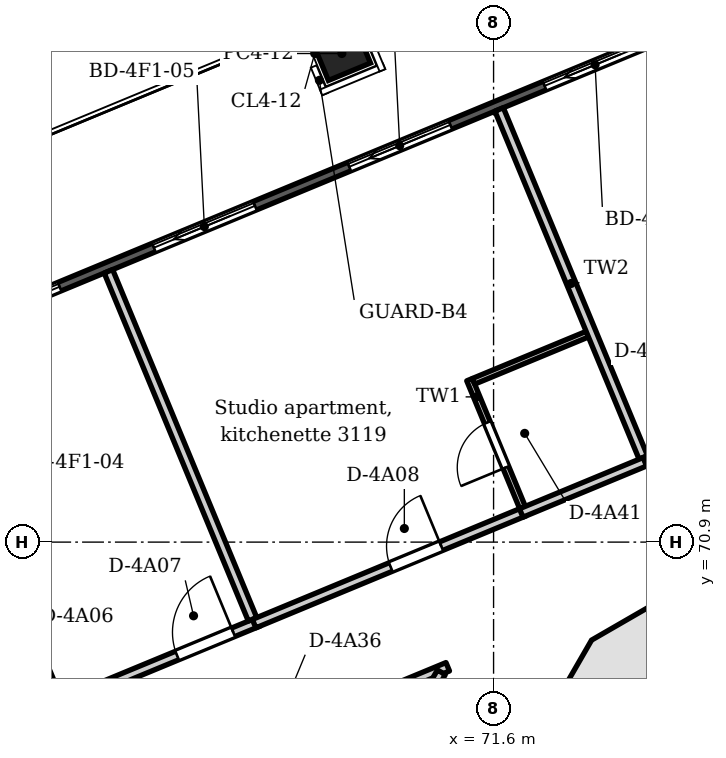
"""IFC4 building model, lengths in metres.
Left out: names, types, materials, properties, quantities, classifications, styles, units other than length and angle.
Written with IfcOpenShell. Run it as: python <this file> out.ifc"""

import sys

from ifc_helpers import new_model, si_unit, direction, frame, frame_2d, origin, origin_2d, place, context, subcontext, project, spatial, polyline, rectangle, outline, extrude, element, fill, save


model = new_model("IFC4")
c1 = context("Model", 3, precision=1e-05, world=origin(), true_north=direction((0.0, 1.0)))
c2 = subcontext(c1, "Body", "Model", "MODEL_VIEW")
j1 = project(units=[si_unit("LENGTHUNIT", "METRE"), si_unit("PLANEANGLEUNIT", "RADIAN")], contexts=[c1])
p1 = place(None, origin())
s1 = spatial("IfcSite", under=j1, at=p1, CompositionType="ELEMENT")
p2 = place(p1, origin())
s2 = spatial("IfcBuilding", under=s1, at=p2, CompositionType="ELEMENT")
p3 = place(p2, frame((0.0, 0.0, 124.2)))
s3 = spatial("IfcBuildingStorey", under=s2, at=p3, CompositionType="ELEMENT", Elevation=124.2)
p4 = place(p3, frame((77.74, 71.383, 0.0), z_axis=(0.0, 0.0, 1.0), x_axis=(-0.866003133579, -0.500038571144, 0.0)))
e1 = element("IfcWall", 1, at=p4, inside=s3, PredefinedType="SHEAR", context=c2, shape_type="SweptSolid", body=[
    extrude(outline(polyline([(0.0, -0.45), (4.969, -0.45), (4.728, 0.45), (0.241, 0.45), (0.0, -0.45)])), origin(), (0.0, 0.0, 1.0), 3.6),
])
p5 = place(p4, frame((0.895, 0.0, 0.0)))
e2 = element("IfcOpeningElement", 2, at=p5, cuts=e1, PredefinedType="OPENING", context=c2, shape_type="SweptSolid", body=[
    extrude(rectangle(XDim=0.9, YDim=2.1, at=frame_2d((0.45, 1.05))), frame((0.0, 0.46, 0.0), z_axis=(0.0, -1.0, 0.0), x_axis=(1.0, 0.0, 0.0)), (0.0, 0.0, 1.0), 0.92),
])
p6 = place(p4, frame((3.184, 0.0, 0.0)))
e3 = element("IfcOpeningElement", 3, at=p6, cuts=e1, PredefinedType="OPENING", context=c2, shape_type="SweptSolid", body=[
    extrude(rectangle(XDim=0.9, YDim=2.1, at=frame_2d((0.45, 1.05))), frame((0.0, 0.46, 0.0), z_axis=(0.0, -1.0, 0.0), x_axis=(1.0, 0.0, 0.0)), (0.0, 0.0, 1.0), 0.92),
])
p7 = place(p3, frame((73.602, 69.063, 0.0), z_axis=(0.0, 0.0, 1.0), x_axis=(-0.500038571144, -0.866003133579, 0.0)))
e4 = element("IfcWall", 4, at=p7, inside=s3, PredefinedType="SHEAR", context=c2, shape_type="SweptSolid", body=[
    extrude(outline(polyline([(0.0, -0.45), (4.969, -0.45), (4.728, 0.45), (0.241, 0.45), (0.0, -0.45)])), origin(), (0.0, 0.0, 1.0), 3.6),
])
p8 = place(p7, frame((1.285, 0.0, 0.0)))
e5 = element("IfcOpeningElement", 5, at=p8, cuts=e4, PredefinedType="OPENING", context=c2, shape_type="SweptSolid", body=[
    extrude(rectangle(XDim=2.4, YDim=2.1, at=frame_2d((1.2, 1.05))), frame((0.0, 0.46, 0.0), z_axis=(0.0, -1.0, 0.0), x_axis=(1.0, 0.0, 0.0)), (0.0, 0.0, 1.0), 0.92),
])
p9 = place(p3, frame((69.105, 78.935, -0.35), z_axis=(0.0, 0.0, 1.0), x_axis=(0.923879532511, 0.382683432365, 0.0)))
e6 = element("IfcColumn", 6, at=p9, inside=s3, PredefinedType="COLUMN", context=c2, shape_type="SweptSolid", body=[
    extrude(rectangle(XDim=0.75, YDim=0.65, at=origin_2d()), origin(), (0.0, 0.0, 1.0), 3.95),
])
p10 = place(p3, frame((52.387, 70.1, 0.0), z_axis=(0.0, 0.0, 1.0), x_axis=(0.92388051416, 0.382681062447, 0.0)))
e7 = element("IfcWall", 7, at=p10, inside=s3, PredefinedType="SOLIDWALL", context=c2, shape_type="SweptSolid", body=[
    extrude(outline(polyline([(0.149, 0.075), (0.149, -0.075), (45.057, -0.075), (45.057, 0.075), (0.149, 0.075)])), origin(), (0.0, 0.0, 1.0), 3.3),
])
p11 = place(p10, frame((1.239, 0.0, 0.0)))
e8 = element("IfcOpeningElement", 8, at=p11, cuts=e7, PredefinedType="OPENING", context=c2, shape_type="SweptSolid", body=[
    extrude(rectangle(XDim=1.8, YDim=2.6, at=frame_2d((0.9, 1.3))), frame((0.0, 0.085, 0.0), z_axis=(0.0, -1.0, 0.0), x_axis=(1.0, 0.0, 0.0)), (0.0, 0.0, 1.0), 0.17),
])
p12 = place(p10, frame((4.316, 0.0, 0.0)))
e9 = element("IfcOpeningElement", 9, at=p12, cuts=e7, PredefinedType="OPENING", context=c2, shape_type="SweptSolid", body=[
    extrude(rectangle(XDim=1.8, YDim=2.6, at=frame_2d((0.9, 1.3))), frame((0.0, 0.085, 0.0), z_axis=(0.0, -1.0, 0.0), x_axis=(1.0, 0.0, 0.0)), (0.0, 0.0, 1.0), 0.17),
])
p13 = place(p10, frame((7.793, 0.0, 0.0)))
e10 = element("IfcOpeningElement", 10, at=p13, cuts=e7, PredefinedType="OPENING", context=c2, shape_type="SweptSolid", body=[
    extrude(rectangle(XDim=1.8, YDim=2.6, at=frame_2d((0.9, 1.3))), frame((0.0, 0.085, 0.0), z_axis=(0.0, -1.0, 0.0), x_axis=(1.0, 0.0, 0.0)), (0.0, 0.0, 1.0), 0.17),
])
p14 = place(p10, frame((11.271, 0.0, 0.0)))
e11 = element("IfcOpeningElement", 11, at=p14, cuts=e7, PredefinedType="OPENING", context=c2, shape_type="SweptSolid", body=[
    extrude(rectangle(XDim=1.8, YDim=2.6, at=frame_2d((0.9, 1.3))), frame((0.0, 0.085, 0.0), z_axis=(0.0, -1.0, 0.0), x_axis=(1.0, 0.0, 0.0)), (0.0, 0.0, 1.0), 0.17),
])
p15 = place(p10, frame((14.748, 0.0, 0.0)))
e12 = element("IfcOpeningElement", 12, at=p15, cuts=e7, PredefinedType="OPENING", context=c2, shape_type="SweptSolid", body=[
    extrude(rectangle(XDim=1.8, YDim=2.6, at=frame_2d((0.9, 1.3))), frame((0.0, 0.085, 0.0), z_axis=(0.0, -1.0, 0.0), x_axis=(1.0, 0.0, 0.0)), (0.0, 0.0, 1.0), 0.17),
])
p16 = place(p10, frame((18.226, 0.0, 0.0)))
e13 = element("IfcOpeningElement", 13, at=p16, cuts=e7, PredefinedType="OPENING", context=c2, shape_type="SweptSolid", body=[
    extrude(rectangle(XDim=1.8, YDim=2.6, at=frame_2d((0.9, 1.3))), frame((0.0, 0.085, 0.0), z_axis=(0.0, -1.0, 0.0), x_axis=(1.0, 0.0, 0.0)), (0.0, 0.0, 1.0), 0.17),
])
p17 = place(p10, frame((21.703, 0.0, 0.0)))
e14 = element("IfcOpeningElement", 14, at=p17, cuts=e7, PredefinedType="OPENING", context=c2, shape_type="SweptSolid", body=[
    extrude(rectangle(XDim=1.8, YDim=2.6, at=frame_2d((0.9, 1.3))), frame((0.0, 0.085, 0.0), z_axis=(0.0, -1.0, 0.0), x_axis=(1.0, 0.0, 0.0)), (0.0, 0.0, 1.0), 0.17),
])
p18 = place(p10, frame((25.18, 0.0, 0.0)))
e15 = element("IfcOpeningElement", 15, at=p18, cuts=e7, PredefinedType="OPENING", context=c2, shape_type="SweptSolid", body=[
    extrude(rectangle(XDim=1.8, YDim=2.6, at=frame_2d((0.9, 1.3))), frame((0.0, 0.085, 0.0), z_axis=(0.0, -1.0, 0.0), x_axis=(1.0, 0.0, 0.0)), (0.0, 0.0, 1.0), 0.17),
])
p19 = place(p10, frame((28.658, 0.0, 0.0)))
e16 = element("IfcOpeningElement", 16, at=p19, cuts=e7, PredefinedType="OPENING", context=c2, shape_type="SweptSolid", body=[
    extrude(rectangle(XDim=1.8, YDim=2.6, at=frame_2d((0.9, 1.3))), frame((0.0, 0.085, 0.0), z_axis=(0.0, -1.0, 0.0), x_axis=(1.0, 0.0, 0.0)), (0.0, 0.0, 1.0), 0.17),
])
p20 = place(p10, frame((32.135, 0.0, 0.0)))
e17 = element("IfcOpeningElement", 17, at=p20, cuts=e7, PredefinedType="OPENING", context=c2, shape_type="SweptSolid", body=[
    extrude(rectangle(XDim=1.8, YDim=2.6, at=frame_2d((0.9, 1.3))), frame((0.0, 0.085, 0.0), z_axis=(0.0, -1.0, 0.0), x_axis=(1.0, 0.0, 0.0)), (0.0, 0.0, 1.0), 0.17),
])
p21 = place(p10, frame((35.613, 0.0, 0.0)))
e18 = element("IfcOpeningElement", 18, at=p21, cuts=e7, PredefinedType="OPENING", context=c2, shape_type="SweptSolid", body=[
    extrude(rectangle(XDim=1.8, YDim=2.6, at=frame_2d((0.9, 1.3))), frame((0.0, 0.085, 0.0), z_axis=(0.0, -1.0, 0.0), x_axis=(1.0, 0.0, 0.0)), (0.0, 0.0, 1.0), 0.17),
])
p22 = place(p10, frame((39.09, 0.0, 0.0)))
e19 = element("IfcOpeningElement", 19, at=p22, cuts=e7, PredefinedType="OPENING", context=c2, shape_type="SweptSolid", body=[
    extrude(rectangle(XDim=1.8, YDim=2.6, at=frame_2d((0.9, 1.3))), frame((0.0, 0.085, 0.0), z_axis=(0.0, -1.0, 0.0), x_axis=(1.0, 0.0, 0.0)), (0.0, 0.0, 1.0), 0.17),
])
p23 = place(p10, frame((42.167, 0.0, 0.0)))
e20 = element("IfcOpeningElement", 20, at=p23, cuts=e7, PredefinedType="OPENING", context=c2, shape_type="SweptSolid", body=[
    extrude(rectangle(XDim=1.8, YDim=2.6, at=frame_2d((0.9, 1.3))), frame((0.0, 0.085, 0.0), z_axis=(0.0, -1.0, 0.0), x_axis=(1.0, 0.0, 0.0)), (0.0, 0.0, 1.0), 0.17),
])
p24 = place(p3, origin())
e21 = element("IfcWall", 21, at=p24, inside=s3, PredefinedType="PARAPET", context=c2, shape_type="SweptSolid", body=[
    extrude(outline(polyline([(76.333, 82.578), (47.563, 75.405), (47.803, 75.156), (74.457, 81.802), (76.333, 82.578)])), origin(), (0.0, 0.0, 1.0), 1.1),
])
p25 = place(p3, frame((62.053, 74.022, 0.0), z_axis=(0.0, 0.0, 1.0), x_axis=(0.382821977845, -0.923822132923, 0.0)))
e22 = element("IfcWall", 22, at=p25, inside=s3, PredefinedType="PARTITIONING", context=c2, shape_type="SweptSolid", body=[
    extrude(rectangle(XDim=6.344, YDim=0.15, at=frame_2d((3.172, 0.0))), origin(), (0.0, 0.0, 1.0), 3.3),
])
p26 = place(p3, frame((64.519, 68.258, 0.0), z_axis=(0.0, 0.0, 1.0), x_axis=(0.923914357305, 0.382599347053, 0.0)))
e23 = element("IfcWall", 23, at=p26, inside=s3, PredefinedType="PARTITIONING", context=c2, shape_type="SweptSolid", body=[
    extrude(rectangle(XDim=3.484, YDim=0.15, at=frame_2d((1.742, 0.0))), origin(), (0.0, 0.0, 1.0), 3.3),
])
p27 = place(p26, frame((2.031, 0.0, 0.0)))
e24 = element("IfcOpeningElement", 24, at=p27, cuts=e23, PredefinedType="OPENING", context=c2, shape_type="SweptSolid", body=[
    extrude(rectangle(XDim=1.0, YDim=2.1, at=frame_2d((0.5, 1.05))), frame((0.0, 0.085, 0.0), z_axis=(0.0, -1.0, 0.0), x_axis=(1.0, 0.0, 0.0)), (0.0, 0.0, 1.0), 0.17),
])
p28 = place(p3, frame((65.266, 75.353, 0.0), z_axis=(0.0, 0.0, 1.0), x_axis=(0.382610562407, -0.923909712869, 0.0)))
e25 = element("IfcWall", 25, at=p28, inside=s3, PredefinedType="PARTITIONING", context=c2, shape_type="SweptSolid", body=[
    extrude(rectangle(XDim=6.194, YDim=0.15, at=frame_2d((3.097, 0.0))), origin(), (0.0, 0.0, 1.0), 3.3),
])
p29 = place(p3, frame((65.981, 66.834, 0.0), z_axis=(0.0, 0.0, 1.0), x_axis=(0.923830903719, 0.382800811563, 0.0)))
e26 = element("IfcWall", 26, at=p29, inside=s3, PredefinedType="PARTITIONING", context=c2, shape_type="SweptSolid", body=[
    extrude(rectangle(XDim=5.266, YDim=0.15, at=frame_2d((2.633, 0.0))), origin(), (0.0, 0.0, 1.0), 3.3),
])
p30 = place(p29, frame((2.146, 0.0, 0.0)))
e27 = element("IfcOpeningElement", 27, at=p30, cuts=e26, PredefinedType="OPENING", context=c2, shape_type="SweptSolid", body=[
    extrude(rectangle(XDim=0.9, YDim=2.1, at=frame_2d((0.45, 1.05))), frame((0.0, 0.085, 0.0), z_axis=(0.0, -1.0, 0.0), x_axis=(1.0, 0.0, 0.0)), (0.0, 0.0, 1.0), 0.17),
])
p31 = place(p3, frame((67.662, 69.559, 0.0), z_axis=(0.0, 0.0, 1.0), x_axis=(0.923858526334, 0.382734141827, 0.0)))
e28 = element("IfcWall", 28, at=p31, inside=s3, PredefinedType="PARTITIONING", context=c2, shape_type="SweptSolid", body=[
    extrude(rectangle(XDim=4.812, YDim=0.15, at=frame_2d((2.406, 0.0))), origin(), (0.0, 0.0, 1.0), 3.3),
])
p32 = place(p31, frame((2.431, 0.0, 0.0)))
e29 = element("IfcOpeningElement", 29, at=p32, cuts=e28, PredefinedType="OPENING", context=c2, shape_type="SweptSolid", body=[
    extrude(rectangle(XDim=0.9, YDim=2.1, at=frame_2d((0.45, 1.05))), frame((0.0, 0.085, 0.0), z_axis=(0.0, -1.0, 0.0), x_axis=(1.0, 0.0, 0.0)), (0.0, 0.0, 1.0), 0.17),
])
p33 = place(p3, frame((68.852, 65.487, 0.0), z_axis=(0.0, 0.0, 1.0), x_axis=(0.500065504582, 0.865987581393, 0.0)))
e30 = element("IfcWall", 30, at=p33, inside=s3, PredefinedType="PARTITIONING", context=c2, shape_type="SweptSolid", body=[
    extrude(rectangle(XDim=3.778, YDim=0.15, at=frame_2d((1.889, 0.0))), origin(), (0.0, 0.0, 1.0), 3.3),
])
p34 = place(p3, frame((71.205, 73.571, 0.0), z_axis=(0.0, 0.0, 1.0), x_axis=(0.382557141415, -0.923931833824, 0.0)))
e31 = element("IfcWall", 31, at=p34, inside=s3, PredefinedType="PARTITIONING", context=c2, shape_type="SweptSolid", body=[
    extrude(rectangle(XDim=2.275, YDim=0.1, at=frame_2d((1.138, 0.0))), origin(), (0.0, 0.0, 1.0), 3.3),
])
p35 = place(p34, frame((0.763, 0.0, 0.0)))
e32 = element("IfcOpeningElement", 32, at=p35, cuts=e31, PredefinedType="OPENING", context=c2, shape_type="SweptSolid", body=[
    extrude(rectangle(XDim=0.8, YDim=2.1, at=frame_2d((0.4, 1.05))), frame((0.0, 0.06, 0.0), z_axis=(0.0, -1.0, 0.0), x_axis=(1.0, 0.0, 0.0)), (0.0, 0.0, 1.0), 0.12),
])
p36 = place(p3, frame((71.27, 73.544, 0.0), z_axis=(0.0, 0.0, 1.0), x_axis=(0.923877272036, 0.382688889591, 0.0)))
e33 = element("IfcWall", 33, at=p36, inside=s3, PredefinedType="PARTITIONING", context=c2, shape_type="SweptSolid", body=[
    extrude(rectangle(XDim=2.026, YDim=0.1, at=frame_2d((1.013, 0.0))), origin(), (0.0, 0.0, 1.0), 3.3),
])
p37 = place(p3, frame((71.691, 78.015, 0.0), z_axis=(0.0, 0.0, 1.0), x_axis=(0.38274513347, -0.923853972663, 0.0)))
e34 = element("IfcWall", 34, at=p37, inside=s3, PredefinedType="PARTITIONING", context=c2, shape_type="SweptSolid", body=[
    extrude(rectangle(XDim=6.194, YDim=0.15, at=frame_2d((3.097, 0.0))), origin(), (0.0, 0.0, 1.0), 3.3),
])
p38 = place(p3, frame((72.055, 71.379, 0.0), z_axis=(0.0, 0.0, 1.0), x_axis=(0.923863223013, 0.382722804604, 0.0)))
e35 = element("IfcWall", 35, at=p38, inside=s3, PredefinedType="PARTITIONING", context=c2, shape_type="SweptSolid", body=[
    extrude(rectangle(XDim=2.208, YDim=0.15, at=frame_2d((1.104, 0.0))), origin(), (0.0, 0.0, 1.0), 3.3),
])
p39 = place(p3, frame((74.088, 72.221, 0.0), z_axis=(0.0, 0.0, 1.0), x_axis=(0.923720156635, 0.383067973375, 0.0)))
e36 = element("IfcWall", 36, at=p39, inside=s3, PredefinedType="PARTITIONING", context=c2, shape_type="SweptSolid", body=[
    extrude(rectangle(XDim=1.535, YDim=0.15, at=frame_2d((0.768, 0.0))), origin(), (0.0, 0.0, 1.0), 3.3),
])
p40 = place(p39, frame((0.269, 0.0, 0.0)))
e37 = element("IfcOpeningElement", 37, at=p40, cuts=e36, PredefinedType="OPENING", context=c2, shape_type="SweptSolid", body=[
    extrude(rectangle(XDim=1.0, YDim=2.1, at=frame_2d((0.5, 1.05))), frame((0.0, 0.085, 0.0), z_axis=(0.0, -1.0, 0.0), x_axis=(1.0, 0.0, 0.0)), (0.0, 0.0, 1.0), 0.17),
])
p41 = place(p14, origin())
e38 = element("IfcDoor", 38, at=p41, inside=s3, OperationType="SLIDING_TO_LEFT", PredefinedType="DOOR", context=c2, shape_type="SweptSolid", body=[
    extrude(rectangle(XDim=1.8, YDim=2.6, at=frame_2d((0.9, 1.3))), frame((0.0, 0.025, 0.0), z_axis=(0.0, -1.0, 0.0), x_axis=(1.0, 0.0, 0.0)), (0.0, 0.0, 1.0), 0.05),
])
fill(e11, e38)
p42 = place(p15, origin())
e39 = element("IfcDoor", 39, at=p42, inside=s3, OperationType="SLIDING_TO_LEFT", PredefinedType="DOOR", context=c2, shape_type="SweptSolid", body=[
    extrude(rectangle(XDim=1.8, YDim=2.6, at=frame_2d((0.9, 1.3))), frame((0.0, 0.025, 0.0), z_axis=(0.0, -1.0, 0.0), x_axis=(1.0, 0.0, 0.0)), (0.0, 0.0, 1.0), 0.05),
])
fill(e12, e39)
p43 = place(p16, origin())
e40 = element("IfcDoor", 40, at=p43, inside=s3, OperationType="SLIDING_TO_LEFT", PredefinedType="DOOR", context=c2, shape_type="SweptSolid", body=[
    extrude(rectangle(XDim=1.8, YDim=2.6, at=frame_2d((0.9, 1.3))), frame((0.0, 0.025, 0.0), z_axis=(0.0, -1.0, 0.0), x_axis=(1.0, 0.0, 0.0)), (0.0, 0.0, 1.0), 0.05),
])
fill(e13, e40)
p44 = place(p17, origin())
e41 = element("IfcDoor", 41, at=p44, inside=s3, OperationType="SLIDING_TO_LEFT", PredefinedType="DOOR", context=c2, shape_type="SweptSolid", body=[
    extrude(rectangle(XDim=1.8, YDim=2.6, at=frame_2d((0.9, 1.3))), frame((0.0, 0.025, 0.0), z_axis=(0.0, -1.0, 0.0), x_axis=(1.0, 0.0, 0.0)), (0.0, 0.0, 1.0), 0.05),
])
fill(e14, e41)
p45 = place(p27, origin())
e42 = element("IfcDoor", 42, at=p45, inside=s3, OperationType="SINGLE_SWING_RIGHT", PredefinedType="DOOR", context=c2, shape_type="SweptSolid", body=[
    extrude(rectangle(XDim=1.0, YDim=2.1, at=frame_2d((0.5, 1.05))), frame((0.0, 0.025, 0.0), z_axis=(0.0, -1.0, 0.0), x_axis=(1.0, 0.0, 0.0)), (0.0, 0.0, 1.0), 0.05),
])
fill(e24, e42)
p46 = place(p32, origin())
e43 = element("IfcDoor", 43, at=p46, inside=s3, OperationType="SINGLE_SWING_RIGHT", PredefinedType="DOOR", context=c2, shape_type="SweptSolid", body=[
    extrude(rectangle(XDim=0.9, YDim=2.1, at=frame_2d((0.45, 1.05))), frame((0.0, 0.025, 0.0), z_axis=(0.0, -1.0, 0.0), x_axis=(1.0, 0.0, 0.0)), (0.0, 0.0, 1.0), 0.05),
])
fill(e29, e43)
p47 = place(p35, frame((0.8, 0.0, 0.0), z_axis=(0.0, 0.0, 1.0), x_axis=(-1.0, 0.0, 0.0)))
e44 = element("IfcDoor", 44, at=p47, inside=s3, OperationType="SINGLE_SWING_LEFT", PredefinedType="DOOR", context=c2, shape_type="SweptSolid", body=[
    extrude(rectangle(XDim=0.8, YDim=2.1, at=frame_2d((0.4, 1.05))), frame((0.0, 0.025, 0.0), z_axis=(0.0, -1.0, 0.0), x_axis=(1.0, 0.0, 0.0)), (0.0, 0.0, 1.0), 0.05),
])
fill(e32, e44)
save(model, sys.argv[1])
